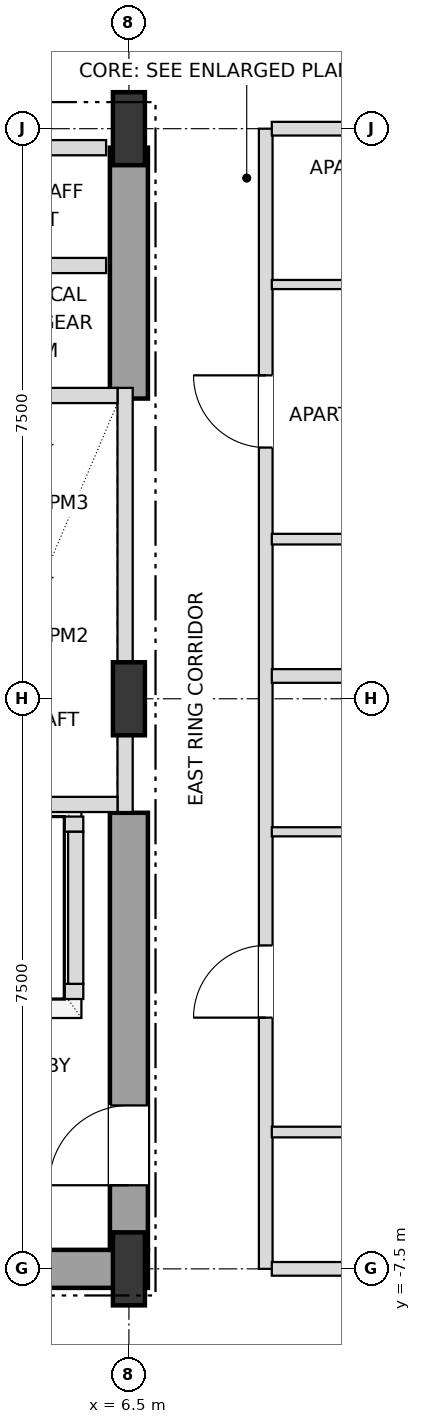
"""IFC4 building model, lengths in metres.
Left out: names, types, materials, properties, quantities, classifications, styles, units other than length and angle.
Written with IfcOpenShell. Run it as: python <this file> out.ifc"""

import sys

from ifc_helpers import new_model, si_unit, direction, frame, frame_2d, origin, origin_2d, place, context, subcontext, project, spatial, rectangle, i_section, extrude, element, fill, save


model = new_model("IFC4")
c1 = context("Model", 3, precision=1e-05, world=origin(), true_north=direction((0.0, 1.0)))
c2 = subcontext(c1, "Body", "Model", "MODEL_VIEW")
j1 = project(units=[si_unit("LENGTHUNIT", "METRE"), si_unit("PLANEANGLEUNIT", "RADIAN")], contexts=[c1])
p1 = place(None, origin())
s1 = spatial("IfcSite", under=j1, at=p1, CompositionType="ELEMENT")
p2 = place(p1, origin())
s2 = spatial("IfcBuilding", under=s1, at=p2, CompositionType="ELEMENT")
p3 = place(p2, frame((0.0, 0.0, 75.6)))
s3 = spatial("IfcBuildingStorey", under=s2, at=p3, CompositionType="ELEMENT", Elevation=75.6)
for number, where, z_axis, x_axis in (
    (1, (6.5, -7.5, 0.0), (0.0, 0.0, 1.0), (1.0, 0.0, 0.0)),
    (2, (6.5, 0.0, 0.0), (0.0, 0.0, 1.0), (1.0, 0.0, 0.0)),
    (3, (6.5, 7.5, 0.0), (0.0, 0.0, 1.0), (1.0, 0.0, 0.0)),
):
    element("IfcColumn", number, at=place(p3, frame(where, z_axis=z_axis, x_axis=x_axis)), inside=s3, PredefinedType="COLUMN", context=c2, shape_type="SweptSolid", body=[
        extrude(i_section(OverallWidth=0.42, OverallDepth=0.96, WebThickness=0.022, FlangeThickness=0.034, at=origin_2d()), origin(), (0.0, 0.0, 1.0), 3.6),
    ])
p4 = place(p3, frame((0.0, -7.5, 0.0), z_axis=(0.0, 0.0, 1.0), x_axis=(1.0, 0.0, 0.0)))
e4 = element("IfcWall", 4, at=p4, inside=s3, PredefinedType="SHEAR", context=c2, shape_type="SweptSolid", body=[
    extrude(rectangle(XDim=6.75, YDim=0.5, at=frame_2d((3.375, 0.0))), origin(), (0.0, 0.0, 1.0), 3.38),
])
p5 = place(p3, frame((6.5, -7.25, 0.0), z_axis=(0.0, 0.0, 1.0), x_axis=(0.0, 1.0, 0.0)))
e5 = element("IfcWall", 5, at=p5, inside=s3, PredefinedType="SHEAR", context=c2, shape_type="SweptSolid", body=[
    extrude(rectangle(XDim=5.75, YDim=0.5, at=frame_2d((2.875, 0.0))), origin(), (0.0, 0.0, 1.0), 3.38),
])
p6 = place(p5, frame((0.85, 0.0, 0.0)))
e6 = element("IfcOpeningElement", 6, at=p6, cuts=e5, PredefinedType="OPENING", context=c2, shape_type="SweptSolid", body=[
    extrude(rectangle(XDim=1.05, YDim=2.15, at=frame_2d((0.525, 1.075))), frame((0.0, 0.26, 0.0), z_axis=(0.0, -1.0, 0.0), x_axis=(1.0, 0.0, 0.0)), (0.0, 0.0, 1.0), 0.52),
])
p7 = place(p3, frame((6.5, 3.95, 0.0), z_axis=(0.0, 0.0, 1.0), x_axis=(0.0, 1.0, 0.0)))
e7 = element("IfcWall", 7, at=p7, inside=s3, PredefinedType="SHEAR", context=c2, shape_type="SweptSolid", body=[
    extrude(rectangle(XDim=3.3, YDim=0.5, at=frame_2d((1.65, 0.0))), origin(), (0.0, 0.0, 1.0), 3.38),
])
p8 = place(p3, frame((6.45, -1.49, 0.0), z_axis=(0.0, 0.0, 1.0), x_axis=(0.0, 1.0, 0.0)))
e8 = element("IfcWall", 8, at=p8, inside=s3, PredefinedType="SOLIDWALL", context=c2, shape_type="SweptSolid", body=[
    extrude(rectangle(XDim=5.58, YDim=0.2, at=frame_2d((2.79, 0.0))), origin(), (0.0, 0.0, 1.0), 2.816),
])
for number, where, z_axis, x_axis in (
    (9, (4.15, -1.39, 0.0), (0.0, 0.0, 1.0), (1.0, 0.0, 0.0)),
    (10, (4.15, 3.99, 0.0), (0.0, 0.0, 1.0), (1.0, 0.0, 0.0)),
):
    element("IfcWall", number, at=place(p3, frame(where, z_axis=z_axis, x_axis=x_axis)), inside=s3, PredefinedType="SOLIDWALL", context=c2, shape_type="SweptSolid", body=[
        extrude(rectangle(XDim=2.2, YDim=0.2, at=frame_2d((1.1, 0.0))), origin(), (0.0, 0.0, 1.0), 3.38),
    ])
p9 = place(p3, frame((1.8, -3.85, 0.0), z_axis=(0.0, 0.0, 1.0), x_axis=(1.0, 0.0, 0.0)))
e11 = element("IfcWall", 11, at=p9, inside=s3, PredefinedType="SOLIDWALL", context=c2, shape_type="SweptSolid", body=[
    extrude(rectangle(XDim=4.1, YDim=0.2, at=frame_2d((2.05, 0.0))), origin(), (0.0, 0.0, 1.0), 3.38),
])
p10 = place(p9, frame((0.45, 0.0, 0.0)))
e12 = element("IfcOpeningElement", 12, at=p10, cuts=e11, PredefinedType="OPENING", context=c2, shape_type="SweptSolid", body=[
    extrude(rectangle(XDim=1.2, YDim=2.2, at=frame_2d((0.6, 1.1))), frame((0.0, 0.11, 0.0), z_axis=(0.0, -1.0, 0.0), x_axis=(1.0, 0.0, 0.0)), (0.0, 0.0, 1.0), 0.22),
])
p11 = place(p9, frame((2.45, 0.0, 0.0)))
e13 = element("IfcOpeningElement", 13, at=p11, cuts=e11, PredefinedType="OPENING", context=c2, shape_type="SweptSolid", body=[
    extrude(rectangle(XDim=1.2, YDim=2.2, at=frame_2d((0.6, 1.1))), frame((0.0, 0.11, 0.0), z_axis=(0.0, -1.0, 0.0), x_axis=(1.0, 0.0, 0.0)), (0.0, 0.0, 1.0), 0.22),
])
p12 = place(p3, frame((1.8, -1.65, 0.0), z_axis=(0.0, 0.0, 1.0), x_axis=(1.0, 0.0, 0.0)))
e14 = element("IfcWall", 14, at=p12, inside=s3, PredefinedType="SOLIDWALL", context=c2, shape_type="SweptSolid", body=[
    extrude(rectangle(XDim=4.1, YDim=0.2, at=frame_2d((2.05, 0.0))), origin(), (0.0, 0.0, 1.0), 3.38),
])
p13 = place(p3, frame((5.8, -3.75, 0.0), z_axis=(0.0, 0.0, 1.0), x_axis=(0.0, 1.0, 0.0)))
e15 = element("IfcWall", 15, at=p13, inside=s3, PredefinedType="SOLIDWALL", context=c2, shape_type="SweptSolid", body=[
    extrude(rectangle(XDim=2.0, YDim=0.2, at=frame_2d((1.0, 0.0))), origin(), (0.0, 0.0, 1.0), 3.38),
])
p14 = place(p3, frame((8.3, -7.5, 0.0), z_axis=(0.0, 0.0, 1.0), x_axis=(0.0, 1.0, 0.0)))
e16 = element("IfcWall", 16, at=p14, inside=s3, PredefinedType="PARTITIONING", context=c2, shape_type="SweptSolid", body=[
    extrude(rectangle(XDim=15.0, YDim=0.18, at=frame_2d((7.5, 0.0))), origin(), (0.0, 0.0, 1.0), 3.38),
])
p15 = place(p14, frame((3.305, 0.0, 0.0)))
e17 = element("IfcOpeningElement", 17, at=p15, cuts=e16, PredefinedType="OPENING", context=c2, shape_type="SweptSolid", body=[
    extrude(rectangle(XDim=0.95, YDim=2.15, at=frame_2d((0.475, 1.075))), frame((0.0, 0.1, 0.0), z_axis=(0.0, -1.0, 0.0), x_axis=(1.0, 0.0, 0.0)), (0.0, 0.0, 1.0), 0.2),
])
p16 = place(p14, frame((10.805, 0.0, 0.0)))
e18 = element("IfcOpeningElement", 18, at=p16, cuts=e16, PredefinedType="OPENING", context=c2, shape_type="SweptSolid", body=[
    extrude(rectangle(XDim=0.95, YDim=2.15, at=frame_2d((0.475, 1.075))), frame((0.0, 0.1, 0.0), z_axis=(0.0, -1.0, 0.0), x_axis=(1.0, 0.0, 0.0)), (0.0, 0.0, 1.0), 0.2),
])
p17 = place(p3, frame((8.38, -7.5, 0.0), z_axis=(0.0, 0.0, 1.0), x_axis=(1.0, 0.0, 0.0)))
e19 = element("IfcWall", 19, at=p17, inside=s3, PredefinedType="PARTITIONING", context=c2, shape_type="SweptSolid", body=[
    extrude(rectangle(XDim=7.64, YDim=0.18, at=frame_2d((3.82, 0.0))), origin(), (0.0, 0.0, 1.0), 2.816),
])
p18 = place(p3, frame((8.38, -5.7, 0.0), z_axis=(0.0, 0.0, 1.0), x_axis=(1.0, 0.0, 0.0)))
e20 = element("IfcWall", 20, at=p18, inside=s3, PredefinedType="PARTITIONING", context=c2, shape_type="SweptSolid", body=[
    extrude(rectangle(XDim=7.64, YDim=0.14, at=frame_2d((3.82, 0.0))), origin(), (0.0, 0.0, 1.0), 2.948),
])
p19 = place(p18, frame((3.37, 0.0, 0.0)))
e21 = element("IfcOpeningElement", 21, at=p19, cuts=e20, PredefinedType="OPENING", context=c2, shape_type="SweptSolid", body=[
    extrude(rectangle(XDim=0.9, YDim=2.1, at=frame_2d((0.45, 1.05))), frame((0.0, 0.08, 0.0), z_axis=(0.0, -1.0, 0.0), x_axis=(1.0, 0.0, 0.0)), (0.0, 0.0, 1.0), 0.16),
])
p20 = place(p3, frame((8.38, -1.75, 0.0), z_axis=(0.0, 0.0, 1.0), x_axis=(1.0, 0.0, 0.0)))
e22 = element("IfcWall", 22, at=p20, inside=s3, PredefinedType="PARTITIONING", context=c2, shape_type="SweptSolid", body=[
    extrude(rectangle(XDim=7.64, YDim=0.12, at=frame_2d((3.82, 0.0))), origin(), (0.0, 0.0, 1.0), 2.948),
])
p21 = place(p20, frame((3.345, 0.0, 0.0)))
e23 = element("IfcOpeningElement", 23, at=p21, cuts=e22, PredefinedType="OPENING", context=c2, shape_type="SweptSolid", body=[
    extrude(rectangle(XDim=0.95, YDim=2.1, at=frame_2d((0.475, 1.05))), frame((0.0, 0.07, 0.0), z_axis=(0.0, -1.0, 0.0), x_axis=(1.0, 0.0, 0.0)), (0.0, 0.0, 1.0), 0.14),
])
p22 = place(p3, frame((8.38, 0.3, 0.0), z_axis=(0.0, 0.0, 1.0), x_axis=(1.0, 0.0, 0.0)))
e24 = element("IfcWall", 24, at=p22, inside=s3, PredefinedType="PARTITIONING", context=c2, shape_type="SweptSolid", body=[
    extrude(rectangle(XDim=7.64, YDim=0.18, at=frame_2d((3.82, 0.0))), origin(), (0.0, 0.0, 1.0), 2.948),
])
p23 = place(p3, frame((8.38, 2.1, 0.0), z_axis=(0.0, 0.0, 1.0), x_axis=(1.0, 0.0, 0.0)))
e25 = element("IfcWall", 25, at=p23, inside=s3, PredefinedType="PARTITIONING", context=c2, shape_type="SweptSolid", body=[
    extrude(rectangle(XDim=7.64, YDim=0.14, at=frame_2d((3.82, 0.0))), origin(), (0.0, 0.0, 1.0), 2.948),
])
p24 = place(p23, frame((3.37, 0.0, 0.0)))
e26 = element("IfcOpeningElement", 26, at=p24, cuts=e25, PredefinedType="OPENING", context=c2, shape_type="SweptSolid", body=[
    extrude(rectangle(XDim=0.9, YDim=2.1, at=frame_2d((0.45, 1.05))), frame((0.0, 0.08, 0.0), z_axis=(0.0, -1.0, 0.0), x_axis=(1.0, 0.0, 0.0)), (0.0, 0.0, 1.0), 0.16),
])
p25 = place(p3, frame((8.38, 5.45, 0.0), z_axis=(0.0, 0.0, 1.0), x_axis=(1.0, 0.0, 0.0)))
e27 = element("IfcWall", 27, at=p25, inside=s3, PredefinedType="PARTITIONING", context=c2, shape_type="SweptSolid", body=[
    extrude(rectangle(XDim=7.64, YDim=0.12, at=frame_2d((3.82, 0.0))), origin(), (0.0, 0.0, 1.0), 2.948),
])
p26 = place(p25, frame((3.345, 0.0, 0.0)))
e28 = element("IfcOpeningElement", 28, at=p26, cuts=e27, PredefinedType="OPENING", context=c2, shape_type="SweptSolid", body=[
    extrude(rectangle(XDim=0.95, YDim=2.1, at=frame_2d((0.475, 1.05))), frame((0.0, 0.07, 0.0), z_axis=(0.0, -1.0, 0.0), x_axis=(1.0, 0.0, 0.0)), (0.0, 0.0, 1.0), 0.14),
])
for number, where, z_axis, x_axis in (
    (29, (4.13, 5.7, 0.0), (0.0, 0.0, 1.0), (1.0, 0.0, 0.0)),
    (30, (4.13, 7.25, 0.0), (0.0, 0.0, 1.0), (1.0, 0.0, 0.0)),
):
    element("IfcWall", number, at=place(p3, frame(where, z_axis=z_axis, x_axis=x_axis)), inside=s3, PredefinedType="SOLIDWALL", context=c2, shape_type="SweptSolid", body=[
        extrude(rectangle(XDim=2.07, YDim=0.2, at=frame_2d((1.035, 0.0))), origin(), (0.0, 0.0, 1.0), 3.38),
    ])
p27 = place(p3, frame((8.38, 7.5, 0.0), z_axis=(0.0, 0.0, 1.0), x_axis=(1.0, 0.0, 0.0)))
e31 = element("IfcWall", 31, at=p27, inside=s3, PredefinedType="PARTITIONING", context=c2, shape_type="SweptSolid", body=[
    extrude(rectangle(XDim=7.64, YDim=0.18, at=frame_2d((3.82, 0.0))), origin(), (0.0, 0.0, 1.0), 2.816),
])
p28 = place(p6, origin())
e32 = element("IfcDoor", 32, at=p28, inside=s3, OperationType="SINGLE_SWING_LEFT", PredefinedType="DOOR", context=c2, shape_type="SweptSolid", body=[
    extrude(rectangle(XDim=1.05, YDim=2.15, at=frame_2d((0.525, 1.075))), frame((0.0, 0.025, 0.0), z_axis=(0.0, -1.0, 0.0), x_axis=(1.0, 0.0, 0.0)), (0.0, 0.0, 1.0), 0.05),
])
fill(e6, e32)
p29 = place(p15, origin())
e33 = element("IfcDoor", 33, at=p29, inside=s3, OperationType="SINGLE_SWING_LEFT", PredefinedType="DOOR", context=c2, shape_type="SweptSolid", body=[
    extrude(rectangle(XDim=0.95, YDim=2.15, at=frame_2d((0.475, 1.075))), frame((0.0, 0.025, 0.0), z_axis=(0.0, -1.0, 0.0), x_axis=(1.0, 0.0, 0.0)), (0.0, 0.0, 1.0), 0.05),
])
fill(e17, e33)
p30 = place(p16, origin())
e34 = element("IfcDoor", 34, at=p30, inside=s3, OperationType="SINGLE_SWING_RIGHT", PredefinedType="DOOR", context=c2, shape_type="SweptSolid", body=[
    extrude(rectangle(XDim=0.95, YDim=2.15, at=frame_2d((0.475, 1.075))), frame((0.0, 0.025, 0.0), z_axis=(0.0, -1.0, 0.0), x_axis=(1.0, 0.0, 0.0)), (0.0, 0.0, 1.0), 0.05),
])
fill(e18, e34)
save(model, sys.argv[1])
